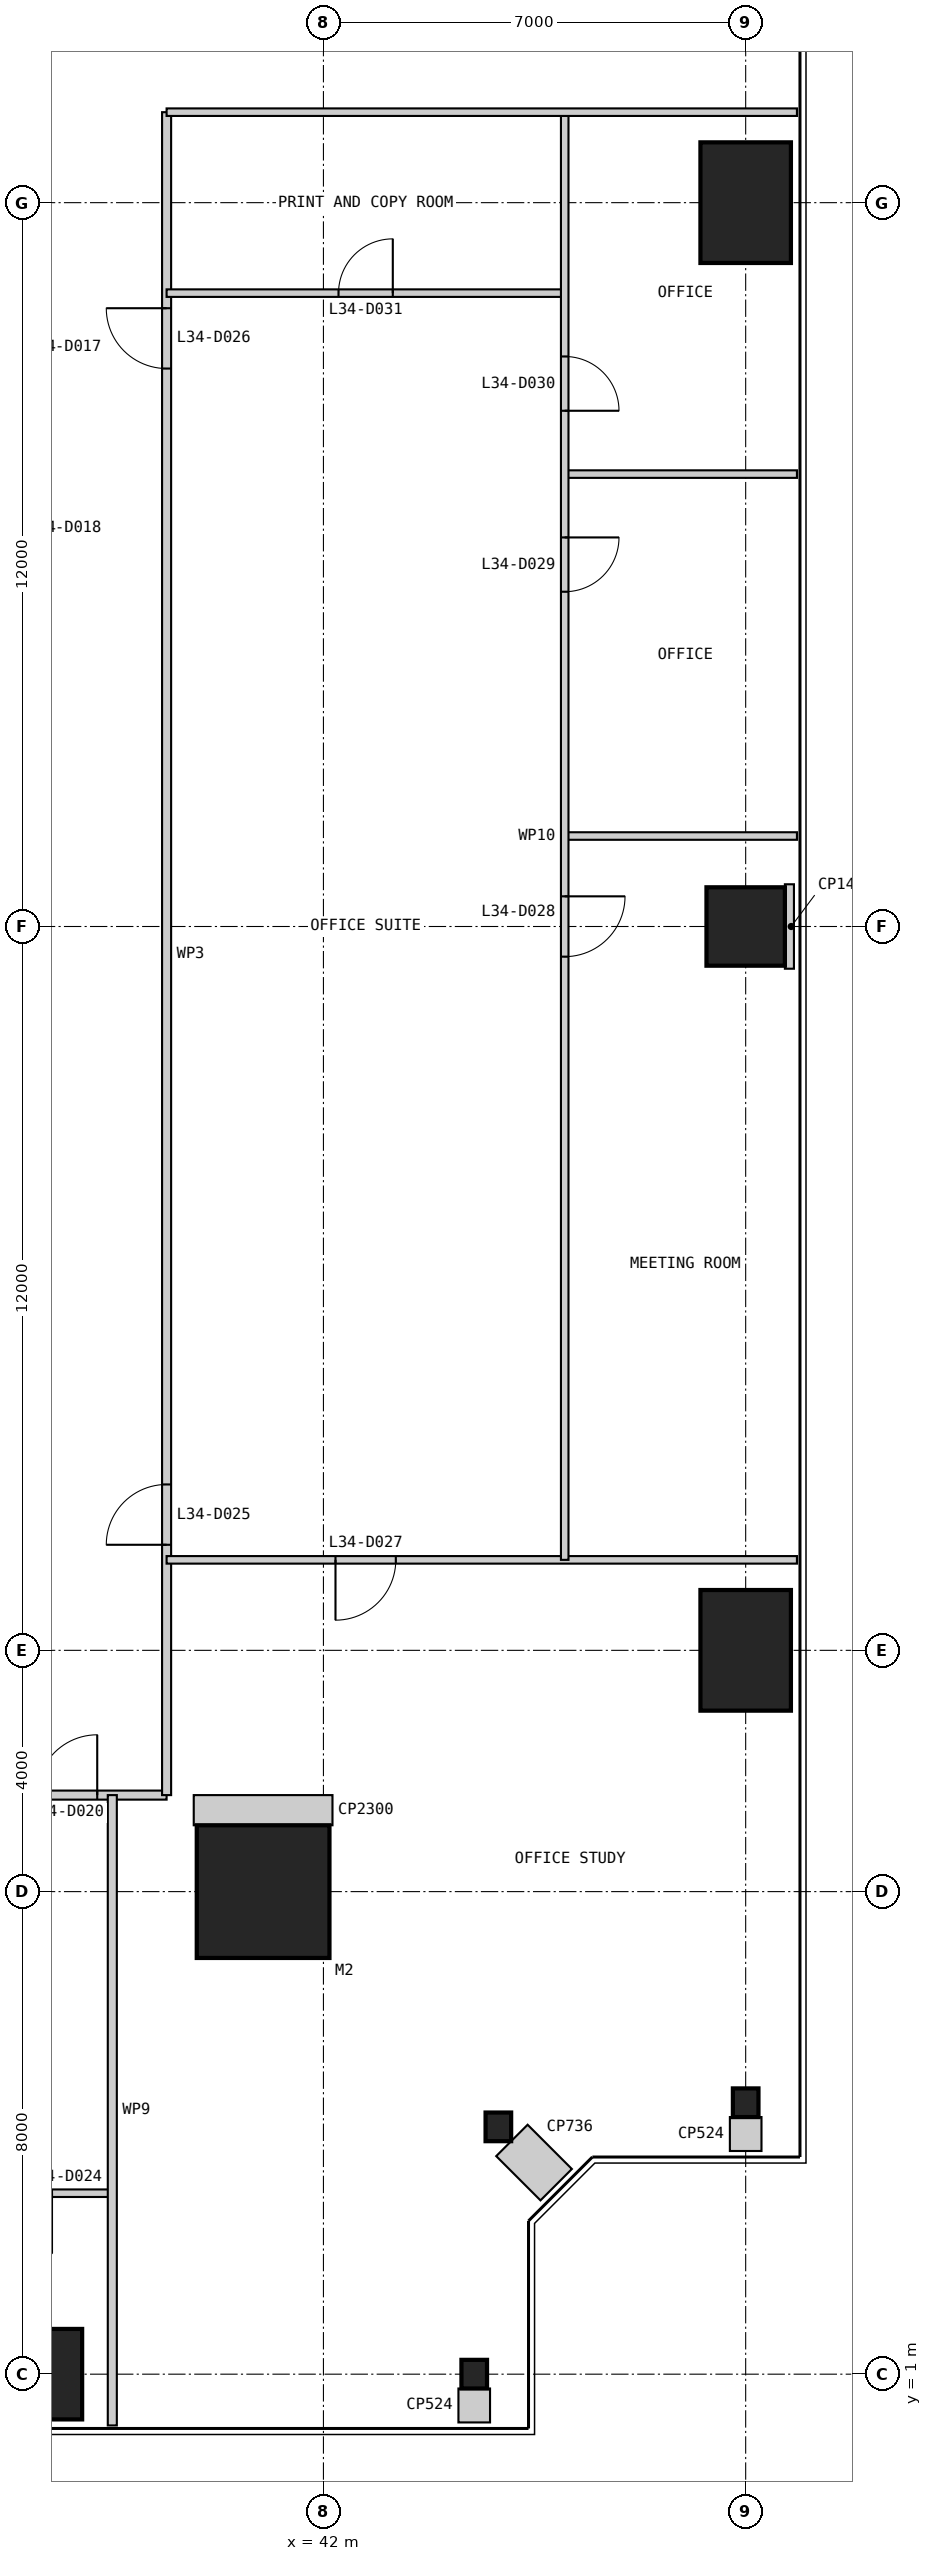
"""IFC4 building model, lengths in metres.
Left out: names, types, materials, properties, quantities, classifications, styles, units other than length and angle.
Written with IfcOpenShell. Run it as: python <this file> out.ifc"""

import sys

from ifc_helpers import new_model, si_unit, direction, frame, frame_2d, origin, origin_2d, place, context, subcontext, project, spatial, rectangle, i_section, extrude, element, fill, save


model = new_model("IFC4")
c1 = context("Model", 3, precision=1e-05, world=origin(), true_north=direction((0.0, 1.0)))
c2 = subcontext(c1, "Body", "Model", "MODEL_VIEW")
j1 = project(units=[si_unit("LENGTHUNIT", "METRE"), si_unit("PLANEANGLEUNIT", "RADIAN")], contexts=[c1])
p1 = place(None, origin())
s1 = spatial("IfcSite", under=j1, at=p1, CompositionType="ELEMENT")
p2 = place(p1, origin())
s2 = spatial("IfcBuilding", under=s1, at=p2, CompositionType="ELEMENT")
p3 = place(p2, frame((0.0, 0.0, 146.4)))
s3 = spatial("IfcBuildingStorey", under=s2, at=p3, CompositionType="ELEMENT", Elevation=146.4)
p4 = place(p3, frame((41.0, 9.0, 0.0), z_axis=(0.0, 0.0, 1.0), x_axis=(1.0, 0.0, 0.0)))
e1 = element("IfcColumn", 1, at=p4, inside=s3, PredefinedType="COLUMN", context=c2, shape_type="SweptSolid", body=[
    extrude(rectangle(XDim=2.2, YDim=2.2, at=origin_2d()), origin(), (0.0, 0.0, 1.0), 4.0),
])
p5 = place(p3, frame((37.0, 1.0, 0.0), z_axis=(0.0, 0.0, 1.0), x_axis=(1.0, 0.0, 0.0)))
e2 = element("IfcColumn", 2, at=p5, inside=s3, PredefinedType="COLUMN", context=c2, shape_type="SweptSolid", body=[
    extrude(rectangle(XDim=2.0, YDim=1.5, at=origin_2d()), origin(), (0.0, 0.0, 1.0), 4.0),
])
for number, where, z_axis, x_axis in (
    (3, (44.5, 1.0, 0.0), (0.0, 0.0, 1.0), (1.0, 0.0, 0.0)),
    (4, (44.9, 5.1, 0.0), (0.0, 0.0, 1.0), (1.0, 0.0, 0.0)),
    (5, (49.0, 5.5, 0.0), (0.0, 0.0, 1.0), (1.0, 0.0, 0.0)),
):
    element("IfcColumn", number, at=place(p3, frame(where, z_axis=z_axis, x_axis=x_axis)), inside=s3, PredefinedType="COLUMN", context=c2, shape_type="SweptSolid", body=[
        extrude(i_section(OverallWidth=0.424, OverallDepth=0.475, WebThickness=0.048, FlangeThickness=0.077, at=origin_2d()), origin(), (0.0, 0.0, 1.0), 4.0),
    ])
p6 = place(p3, frame((49.0, 13.0, 0.0), z_axis=(0.0, 0.0, 1.0), x_axis=(1.0, 0.0, 0.0)))
e6 = element("IfcColumn", 6, at=p6, inside=s3, PredefinedType="COLUMN", context=c2, shape_type="SweptSolid", body=[
    extrude(rectangle(XDim=1.5, YDim=2.0, at=origin_2d()), origin(), (0.0, 0.0, 1.0), 4.0),
])
p7 = place(p3, frame((49.0, 25.0, 0.0), z_axis=(0.0, 0.0, 1.0), x_axis=(1.0, 0.0, 0.0)))
e7 = element("IfcColumn", 7, at=p7, inside=s3, PredefinedType="COLUMN", context=c2, shape_type="SweptSolid", body=[
    extrude(rectangle(XDim=1.3, YDim=1.3, at=origin_2d()), origin(), (0.0, 0.0, 1.0), 4.0),
])
p8 = place(p3, frame((49.0, 37.0, 0.0), z_axis=(0.0, 0.0, 1.0), x_axis=(1.0, 0.0, 0.0)))
e8 = element("IfcColumn", 8, at=p8, inside=s3, PredefinedType="COLUMN", context=c2, shape_type="SweptSolid", body=[
    extrude(rectangle(XDim=1.5, YDim=2.0, at=origin_2d()), origin(), (0.0, 0.0, 1.0), 4.0),
])
p9 = place(p3, frame((10.6, 10.6, 0.0), z_axis=(0.0, 0.0, 1.0), x_axis=(1.0, 0.0, 0.0)))
e9 = element("IfcWall", 9, at=p9, inside=s3, PredefinedType="PARTITIONING", context=c2, shape_type="SweptSolid", body=[
    extrude(rectangle(XDim=28.8, YDim=0.15, at=frame_2d((14.4, 0.0))), origin(), (0.0, 0.0, 1.0), 3.85),
])
p10 = place(p9, frame((4.15, 0.0, 0.0)))
e10 = element("IfcOpeningElement", 10, at=p10, cuts=e9, PredefinedType="OPENING", context=c2, shape_type="SweptSolid", body=[
    extrude(rectangle(XDim=1.0, YDim=2.2, at=frame_2d((0.5, 1.1))), frame((0.0, 0.085, 0.0), z_axis=(0.0, -1.0, 0.0), x_axis=(1.0, 0.0, 0.0)), (0.0, 0.0, 1.0), 0.17),
])
p11 = place(p9, frame((26.65, 0.0, 0.0)))
e11 = element("IfcOpeningElement", 11, at=p11, cuts=e9, PredefinedType="OPENING", context=c2, shape_type="SweptSolid", body=[
    extrude(rectangle(XDim=1.0, YDim=2.2, at=frame_2d((0.5, 1.1))), frame((0.0, 0.085, 0.0), z_axis=(0.0, -1.0, 0.0), x_axis=(1.0, 0.0, 0.0)), (0.0, 0.0, 1.0), 0.17),
])
p12 = place(p3, frame((14.5, 4.0, 0.0), z_axis=(0.0, 0.0, 1.0), x_axis=(1.0, 0.0, 0.0)))
e12 = element("IfcWall", 12, at=p12, inside=s3, PredefinedType="PARTITIONING", context=c2, shape_type="SweptSolid", body=[
    extrude(rectangle(XDim=24.0, YDim=0.125, at=frame_2d((12.0, 0.0))), origin(), (0.0, 0.0, 1.0), 3.85),
])
p13 = place(p12, frame((4.05, 0.0, 0.0)))
e13 = element("IfcOpeningElement", 13, at=p13, cuts=e12, PredefinedType="OPENING", context=c2, shape_type="SweptSolid", body=[
    extrude(rectangle(XDim=0.9, YDim=2.2, at=frame_2d((0.45, 1.1))), frame((0.0, 0.073, 0.0), z_axis=(0.0, -1.0, 0.0), x_axis=(1.0, 0.0, 0.0)), (0.0, 0.0, 1.0), 0.145),
])
p14 = place(p12, frame((10.05, 0.0, 0.0)))
e14 = element("IfcOpeningElement", 14, at=p14, cuts=e12, PredefinedType="OPENING", context=c2, shape_type="SweptSolid", body=[
    extrude(rectangle(XDim=0.9, YDim=2.2, at=frame_2d((0.45, 1.1))), frame((0.0, 0.073, 0.0), z_axis=(0.0, -1.0, 0.0), x_axis=(1.0, 0.0, 0.0)), (0.0, 0.0, 1.0), 0.145),
])
p15 = place(p12, frame((22.0, 0.0, 0.0)))
e15 = element("IfcOpeningElement", 15, at=p15, cuts=e12, PredefinedType="OPENING", context=c2, shape_type="SweptSolid", body=[
    extrude(rectangle(XDim=1.0, YDim=2.2, at=frame_2d((0.5, 1.1))), frame((0.0, 0.073, 0.0), z_axis=(0.0, -1.0, 0.0), x_axis=(1.0, 0.0, 0.0)), (0.0, 0.0, 1.0), 0.145),
])
p16 = place(p3, frame((39.4, 10.6, 0.0), z_axis=(0.0, 0.0, 1.0), x_axis=(0.0, 1.0, 0.0)))
e16 = element("IfcWall", 16, at=p16, inside=s3, PredefinedType="PARTITIONING", context=c2, shape_type="SweptSolid", body=[
    extrude(rectangle(XDim=27.9, YDim=0.15, at=frame_2d((13.95, 0.0))), origin(), (0.0, 0.0, 1.0), 3.85),
])
p17 = place(p16, frame((4.15, 0.0, 0.0)))
e17 = element("IfcOpeningElement", 17, at=p17, cuts=e16, PredefinedType="OPENING", context=c2, shape_type="SweptSolid", body=[
    extrude(rectangle(XDim=1.0, YDim=2.2, at=frame_2d((0.5, 1.1))), frame((0.0, 0.085, 0.0), z_axis=(0.0, -1.0, 0.0), x_axis=(1.0, 0.0, 0.0)), (0.0, 0.0, 1.0), 0.17),
])
p18 = place(p16, frame((23.65, 0.0, 0.0)))
e18 = element("IfcOpeningElement", 18, at=p18, cuts=e16, PredefinedType="OPENING", context=c2, shape_type="SweptSolid", body=[
    extrude(rectangle(XDim=1.0, YDim=2.2, at=frame_2d((0.5, 1.1))), frame((0.0, 0.085, 0.0), z_axis=(0.0, -1.0, 0.0), x_axis=(1.0, 0.0, 0.0)), (0.0, 0.0, 1.0), 0.17),
])
p19 = place(p3, frame((38.5, 0.15, 0.0), z_axis=(0.0, 0.0, 1.0), x_axis=(0.0, 1.0, 0.0)))
e19 = element("IfcWall", 19, at=p19, inside=s3, PredefinedType="PARTITIONING", context=c2, shape_type="SweptSolid", body=[
    extrude(rectangle(XDim=10.45, YDim=0.15, at=frame_2d((5.225, 0.0))), origin(), (0.0, 0.0, 1.0), 3.85),
])
p20 = place(p3, frame((49.85, 14.5, 0.0), z_axis=(0.0, 0.0, 1.0), x_axis=(-1.0, 0.0, 0.0)))
e20 = element("IfcWall", 20, at=p20, inside=s3, PredefinedType="PARTITIONING", context=c2, shape_type="SweptSolid", body=[
    extrude(rectangle(XDim=10.45, YDim=0.125, at=frame_2d((5.225, 0.0))), origin(), (0.0, 0.0, 1.0), 3.85),
])
p21 = place(p20, frame((6.65, 0.0, 0.0)))
e21 = element("IfcOpeningElement", 21, at=p21, cuts=e20, PredefinedType="OPENING", context=c2, shape_type="SweptSolid", body=[
    extrude(rectangle(XDim=1.0, YDim=2.2, at=frame_2d((0.5, 1.1))), frame((0.0, 0.073, 0.0), z_axis=(0.0, -1.0, 0.0), x_axis=(1.0, 0.0, 0.0)), (0.0, 0.0, 1.0), 0.145),
])
for number, where, z_axis, x_axis in (
    (22, (49.85, 26.5, 0.0), (0.0, 0.0, 1.0), (-1.0, 0.0, 0.0)),
    (23, (49.85, 32.5, 0.0), (0.0, 0.0, 1.0), (-1.0, 0.0, 0.0)),
):
    element("IfcWall", number, at=place(p3, frame(where, z_axis=z_axis, x_axis=x_axis)), inside=s3, PredefinedType="PARTITIONING", context=c2, shape_type="SweptSolid", body=[
        extrude(rectangle(XDim=3.85, YDim=0.125, at=frame_2d((1.925, 0.0))), origin(), (0.0, 0.0, 1.0), 3.85),
    ])
p22 = place(p3, frame((46.0, 35.5, 0.0), z_axis=(0.0, 0.0, 1.0), x_axis=(-1.0, 0.0, 0.0)))
e24 = element("IfcWall", 24, at=p22, inside=s3, PredefinedType="PARTITIONING", context=c2, shape_type="SweptSolid", body=[
    extrude(rectangle(XDim=6.6, YDim=0.125, at=frame_2d((3.3, 0.0))), origin(), (0.0, 0.0, 1.0), 3.85),
])
p23 = place(p22, frame((2.85, 0.0, 0.0)))
e25 = element("IfcOpeningElement", 25, at=p23, cuts=e24, PredefinedType="OPENING", context=c2, shape_type="SweptSolid", body=[
    extrude(rectangle(XDim=0.9, YDim=2.2, at=frame_2d((0.45, 1.1))), frame((0.0, 0.073, 0.0), z_axis=(0.0, -1.0, 0.0), x_axis=(1.0, 0.0, 0.0)), (0.0, 0.0, 1.0), 0.145),
])
p24 = place(p3, frame((46.0, 14.5, 0.0), z_axis=(0.0, 0.0, 1.0), x_axis=(0.0, 1.0, 0.0)))
e26 = element("IfcWall", 26, at=p24, inside=s3, PredefinedType="PARTITIONING", context=c2, shape_type="SweptSolid", body=[
    extrude(rectangle(XDim=24.0, YDim=0.125, at=frame_2d((12.0, 0.0))), origin(), (0.0, 0.0, 1.0), 3.238),
])
p25 = place(p24, frame((10.0, 0.0, 0.0)))
e27 = element("IfcOpeningElement", 27, at=p25, cuts=e26, PredefinedType="OPENING", context=c2, shape_type="SweptSolid", body=[
    extrude(rectangle(XDim=1.0, YDim=2.2, at=frame_2d((0.5, 1.1))), frame((0.0, 0.073, 0.0), z_axis=(0.0, -1.0, 0.0), x_axis=(1.0, 0.0, 0.0)), (0.0, 0.0, 1.0), 0.145),
])
p26 = place(p24, frame((16.05, 0.0, 0.0)))
e28 = element("IfcOpeningElement", 28, at=p26, cuts=e26, PredefinedType="OPENING", context=c2, shape_type="SweptSolid", body=[
    extrude(rectangle(XDim=0.9, YDim=2.2, at=frame_2d((0.45, 1.1))), frame((0.0, 0.073, 0.0), z_axis=(0.0, -1.0, 0.0), x_axis=(1.0, 0.0, 0.0)), (0.0, 0.0, 1.0), 0.145),
])
p27 = place(p24, frame((19.05, 0.0, 0.0)))
e29 = element("IfcOpeningElement", 29, at=p27, cuts=e26, PredefinedType="OPENING", context=c2, shape_type="SweptSolid", body=[
    extrude(rectangle(XDim=0.9, YDim=2.2, at=frame_2d((0.45, 1.1))), frame((0.0, 0.073, 0.0), z_axis=(0.0, -1.0, 0.0), x_axis=(1.0, 0.0, 0.0)), (0.0, 0.0, 1.0), 0.145),
])
p28 = place(p3, frame((49.85, 38.5, 0.0), z_axis=(0.0, 0.0, 1.0), x_axis=(-1.0, 0.0, 0.0)))
e30 = element("IfcWall", 30, at=p28, inside=s3, PredefinedType="PARTITIONING", context=c2, shape_type="SweptSolid", body=[
    extrude(rectangle(XDim=10.45, YDim=0.125, at=frame_2d((5.225, 0.0))), origin(), (0.0, 0.0, 1.0), 3.85),
])
p29 = place(p3, frame((41.0, 10.6, 0.0), z_axis=(0.0, 0.0, 1.0), x_axis=(0.0, -1.0, 0.0)))
e31 = element("IfcWall", 31, at=p29, inside=s3, PredefinedType="PARTITIONING", context=c2, shape_type="SweptSolid", body=[
    extrude(rectangle(XDim=0.5, YDim=2.3, at=frame_2d((0.25, 0.0))), origin(), (0.0, 0.0, 1.0), 3.85),
])
p30 = place(p3, frame((44.5, 0.2, 0.0), z_axis=(0.0, 0.0, 1.0), x_axis=(0.0, 1.0, 0.0)))
e32 = element("IfcWall", 32, at=p30, inside=s3, PredefinedType="PARTITIONING", context=c2, shape_type="SweptSolid", body=[
    extrude(rectangle(XDim=0.562, YDim=0.524, at=frame_2d((0.281, 0.0))), origin(), (0.0, 0.0, 1.0), 3.85),
])
p31 = place(p3, frame((45.859, 4.141, 0.0), z_axis=(0.0, 0.0, 1.0), x_axis=(-0.707106781187, 0.707106781187, 0.0)))
e33 = element("IfcWall", 33, at=p31, inside=s3, PredefinedType="PARTITIONING", context=c2, shape_type="SweptSolid", body=[
    extrude(rectangle(XDim=1.038, YDim=0.736, at=frame_2d((0.519, 0.0))), origin(), (0.0, 0.0, 1.0), 3.85),
])
p32 = place(p3, frame((49.0, 4.7, 0.0), z_axis=(0.0, 0.0, 1.0), x_axis=(0.0, 1.0, 0.0)))
e34 = element("IfcWall", 34, at=p32, inside=s3, PredefinedType="PARTITIONING", context=c2, shape_type="SweptSolid", body=[
    extrude(rectangle(XDim=0.562, YDim=0.524, at=frame_2d((0.281, 0.0))), origin(), (0.0, 0.0, 1.0), 3.85),
])
p33 = place(p3, frame((49.8, 25.0, 0.0), z_axis=(0.0, 0.0, 1.0), x_axis=(-1.0, 0.0, 0.0)))
e35 = element("IfcWall", 35, at=p33, inside=s3, PredefinedType="PARTITIONING", context=c2, shape_type="SweptSolid", body=[
    extrude(rectangle(XDim=0.15, YDim=1.4, at=frame_2d((0.075, 0.0))), origin(), (0.0, 0.0, 1.0), 3.85),
])
p34 = place(p11, origin())
e36 = element("IfcDoor", 36, at=p34, inside=s3, OperationType="SINGLE_SWING_RIGHT", PredefinedType="DOOR", context=c2, shape_type="SweptSolid", body=[
    extrude(rectangle(XDim=1.0, YDim=2.2, at=frame_2d((0.5, 1.1))), frame((0.0, 0.025, 0.0), z_axis=(0.0, -1.0, 0.0), x_axis=(1.0, 0.0, 0.0)), (0.0, 0.0, 1.0), 0.05),
])
fill(e11, e36)
p35 = place(p17, origin())
e37 = element("IfcDoor", 37, at=p35, inside=s3, OperationType="SINGLE_SWING_LEFT", PredefinedType="DOOR", context=c2, shape_type="SweptSolid", body=[
    extrude(rectangle(XDim=1.0, YDim=2.2, at=frame_2d((0.5, 1.1))), frame((0.0, 0.025, 0.0), z_axis=(0.0, -1.0, 0.0), x_axis=(1.0, 0.0, 0.0)), (0.0, 0.0, 1.0), 0.05),
])
fill(e17, e37)
p36 = place(p18, origin())
e38 = element("IfcDoor", 38, at=p36, inside=s3, OperationType="SINGLE_SWING_RIGHT", PredefinedType="DOOR", context=c2, shape_type="SweptSolid", body=[
    extrude(rectangle(XDim=1.0, YDim=2.2, at=frame_2d((0.5, 1.1))), frame((0.0, 0.025, 0.0), z_axis=(0.0, -1.0, 0.0), x_axis=(1.0, 0.0, 0.0)), (0.0, 0.0, 1.0), 0.05),
])
fill(e18, e38)
p37 = place(p21, origin())
e39 = element("IfcDoor", 39, at=p37, inside=s3, OperationType="SINGLE_SWING_RIGHT", PredefinedType="DOOR", context=c2, shape_type="SweptSolid", body=[
    extrude(rectangle(XDim=1.0, YDim=2.2, at=frame_2d((0.5, 1.1))), frame((0.0, 0.025, 0.0), z_axis=(0.0, -1.0, 0.0), x_axis=(1.0, 0.0, 0.0)), (0.0, 0.0, 1.0), 0.05),
])
fill(e21, e39)
p38 = place(p25, frame((1.0, 0.0, 0.0), z_axis=(0.0, 0.0, 1.0), x_axis=(-1.0, 0.0, 0.0)))
e40 = element("IfcDoor", 40, at=p38, inside=s3, OperationType="SINGLE_SWING_LEFT", PredefinedType="DOOR", context=c2, shape_type="SweptSolid", body=[
    extrude(rectangle(XDim=1.0, YDim=2.2, at=frame_2d((0.5, 1.1))), frame((0.0, 0.025, 0.0), z_axis=(0.0, -1.0, 0.0), x_axis=(1.0, 0.0, 0.0)), (0.0, 0.0, 1.0), 0.05),
])
fill(e27, e40)
p39 = place(p26, frame((0.9, 0.0, 0.0), z_axis=(0.0, 0.0, 1.0), x_axis=(-1.0, 0.0, 0.0)))
e41 = element("IfcDoor", 41, at=p39, inside=s3, OperationType="SINGLE_SWING_LEFT", PredefinedType="DOOR", context=c2, shape_type="SweptSolid", body=[
    extrude(rectangle(XDim=0.9, YDim=2.2, at=frame_2d((0.45, 1.1))), frame((0.0, 0.025, 0.0), z_axis=(0.0, -1.0, 0.0), x_axis=(1.0, 0.0, 0.0)), (0.0, 0.0, 1.0), 0.05),
])
fill(e28, e41)
p40 = place(p27, frame((0.9, 0.0, 0.0), z_axis=(0.0, 0.0, 1.0), x_axis=(-1.0, 0.0, 0.0)))
e42 = element("IfcDoor", 42, at=p40, inside=s3, OperationType="SINGLE_SWING_RIGHT", PredefinedType="DOOR", context=c2, shape_type="SweptSolid", body=[
    extrude(rectangle(XDim=0.9, YDim=2.2, at=frame_2d((0.45, 1.1))), frame((0.0, 0.025, 0.0), z_axis=(0.0, -1.0, 0.0), x_axis=(1.0, 0.0, 0.0)), (0.0, 0.0, 1.0), 0.05),
])
fill(e29, e42)
p41 = place(p23, frame((0.9, 0.0, 0.0), z_axis=(0.0, 0.0, 1.0), x_axis=(-1.0, 0.0, 0.0)))
e43 = element("IfcDoor", 43, at=p41, inside=s3, OperationType="SINGLE_SWING_RIGHT", PredefinedType="DOOR", context=c2, shape_type="SweptSolid", body=[
    extrude(rectangle(XDim=0.9, YDim=2.2, at=frame_2d((0.45, 1.1))), frame((0.0, 0.025, 0.0), z_axis=(0.0, -1.0, 0.0), x_axis=(1.0, 0.0, 0.0)), (0.0, 0.0, 1.0), 0.05),
])
fill(e25, e43)
save(model, sys.argv[1])
